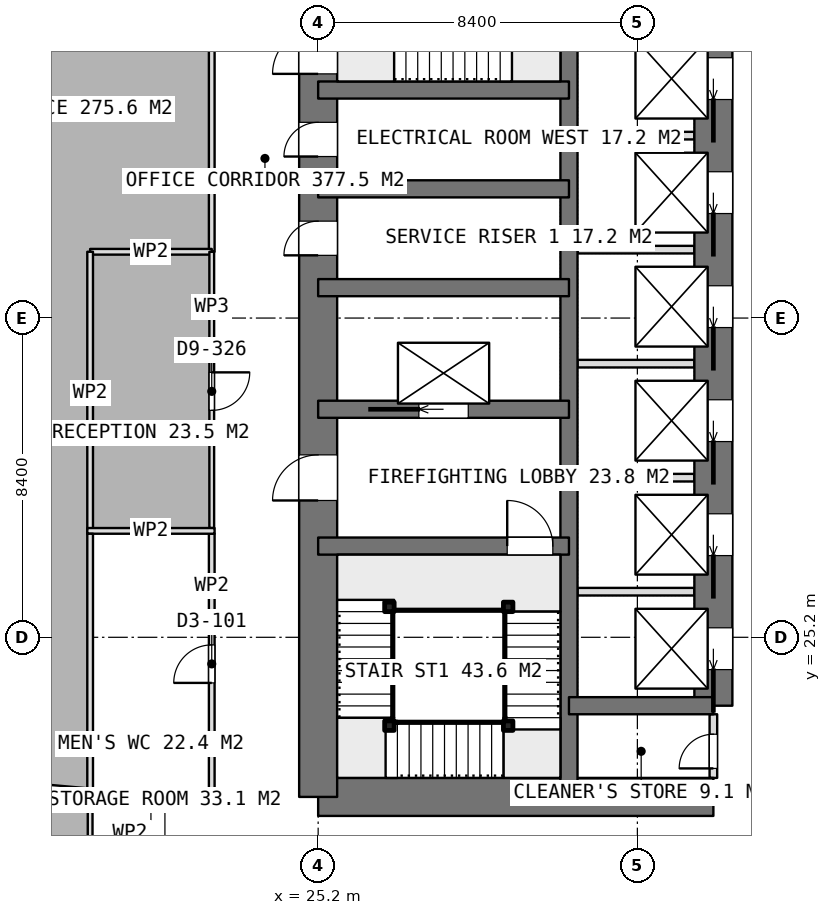
"""IFC4 building model, lengths in metres.
Left out: names, types, materials, properties, quantities, classifications, styles, units other than length and angle.
Written with IfcOpenShell. Run it as: python <this file> out.ifc"""

import sys

from ifc_helpers import new_model, si_unit, direction, frame, frame_2d, origin, origin_2d, place, context, subcontext, project, spatial, rectangle, extrude, element, fill, save


model = new_model("IFC4")
c1 = context("Model", 3, precision=1e-05, world=origin(), true_north=direction((0.0, 1.0)))
c2 = subcontext(c1, "Body", "Model", "MODEL_VIEW")
j1 = project(units=[si_unit("LENGTHUNIT", "METRE"), si_unit("PLANEANGLEUNIT", "RADIAN")], contexts=[c1])
p1 = place(None, origin())
s1 = spatial("IfcSite", under=j1, at=p1, CompositionType="ELEMENT")
p2 = place(p1, origin())
s2 = spatial("IfcBuilding", under=s1, at=p2, CompositionType="ELEMENT")
p3 = place(p2, frame((0.0, 0.0, 99.05)))
s3 = spatial("IfcBuildingStorey", under=s2, at=p3, CompositionType="ELEMENT", Elevation=99.05)
p4 = place(p3, frame((25.2, 21.0, 0.0), z_axis=(0.0, 0.0, 1.0), x_axis=(1.0, 0.0, 0.0)))
e1 = element("IfcWall", 1, at=p4, inside=s3, PredefinedType="SHEAR", context=c2, shape_type="SweptSolid", body=[
    extrude(rectangle(XDim=10.4, YDim=1.0, at=frame_2d((5.2, 0.0))), origin(), (0.0, 0.0, 1.0), 3.75),
])
p5 = place(p3, frame((25.2, 21.0, 0.0), z_axis=(0.0, 0.0, 1.0), x_axis=(0.0, 1.0, 0.0)))
e2 = element("IfcWall", 2, at=p5, inside=s3, PredefinedType="SHEAR", context=c2, shape_type="SweptSolid", body=[
    extrude(rectangle(XDim=25.2, YDim=1.0, at=frame_2d((12.6, 0.0))), origin(), (0.0, 0.0, 1.0), 3.75),
])
p6 = place(p5, frame((7.8, 0.0, 0.0)))
e3 = element("IfcOpeningElement", 3, at=p6, cuts=e2, PredefinedType="OPENING", context=c2, shape_type="SweptSolid", body=[
    extrude(rectangle(XDim=1.2, YDim=2.1, at=frame_2d((0.6, 1.05))), frame((0.0, 0.51, 0.0), z_axis=(0.0, -1.0, 0.0), x_axis=(1.0, 0.0, 0.0)), (0.0, 0.0, 1.0), 1.02),
])
p7 = place(p5, frame((14.25, 0.0, 0.0)))
e4 = element("IfcOpeningElement", 4, at=p7, cuts=e2, PredefinedType="OPENING", context=c2, shape_type="SweptSolid", body=[
    extrude(rectangle(XDim=0.9, YDim=2.1, at=frame_2d((0.45, 1.05))), frame((0.0, 0.51, 0.0), z_axis=(0.0, -1.0, 0.0), x_axis=(1.0, 0.0, 0.0)), (0.0, 0.0, 1.0), 1.02),
])
p8 = place(p5, frame((16.85, 0.0, 0.0)))
e5 = element("IfcOpeningElement", 5, at=p8, cuts=e2, PredefinedType="OPENING", context=c2, shape_type="SweptSolid", body=[
    extrude(rectangle(XDim=0.9, YDim=2.1, at=frame_2d((0.45, 1.05))), frame((0.0, 0.51, 0.0), z_axis=(0.0, -1.0, 0.0), x_axis=(1.0, 0.0, 0.0)), (0.0, 0.0, 1.0), 1.02),
])
p9 = place(p5, frame((19.025, 0.0, 0.0)))
e6 = element("IfcOpeningElement", 6, at=p9, cuts=e2, PredefinedType="OPENING", context=c2, shape_type="SweptSolid", body=[
    extrude(rectangle(XDim=1.2, YDim=2.1, at=frame_2d((0.6, 1.05))), frame((0.0, 0.51, 0.0), z_axis=(0.0, -1.0, 0.0), x_axis=(1.0, 0.0, 0.0)), (0.0, 0.0, 1.0), 1.02),
])
p10 = place(p3, frame((31.8, 21.0, 0.0), z_axis=(0.0, 0.0, 1.0), x_axis=(0.0, 1.0, 0.0)))
e7 = element("IfcWall", 7, at=p10, inside=s3, PredefinedType="SHEAR", context=c2, shape_type="SweptSolid", body=[
    extrude(rectangle(XDim=25.2, YDim=0.45, at=frame_2d((12.6, 0.0))), origin(), (0.0, 0.0, 1.0), 3.75),
])
p11 = place(p3, frame((35.6, 23.4, 0.0), z_axis=(0.0, 0.0, 1.0), x_axis=(0.0, 1.0, 0.0)))
e8 = element("IfcWall", 8, at=p11, inside=s3, PredefinedType="SHEAR", context=c2, shape_type="SweptSolid", body=[
    extrude(rectangle(XDim=18.0, YDim=1.0, at=frame_2d((9.0, 0.0))), origin(), (0.0, 0.0, 1.0), 3.75),
])
p12 = place(p11, frame((0.95, 0.0, 0.0)))
e9 = element("IfcOpeningElement", 9, at=p12, cuts=e8, PredefinedType="OPENING", context=c2, shape_type="SweptSolid", body=[
    extrude(rectangle(XDim=1.1, YDim=2.1, at=frame_2d((0.55, 1.05))), frame((0.0, 0.51, 0.0), z_axis=(0.0, -1.0, 0.0), x_axis=(1.0, 0.0, 0.0)), (0.0, 0.0, 1.0), 1.02),
])
p13 = place(p11, frame((3.95, 0.0, 0.0)))
e10 = element("IfcOpeningElement", 10, at=p13, cuts=e8, PredefinedType="OPENING", context=c2, shape_type="SweptSolid", body=[
    extrude(rectangle(XDim=1.1, YDim=2.1, at=frame_2d((0.55, 1.05))), frame((0.0, 0.51, 0.0), z_axis=(0.0, -1.0, 0.0), x_axis=(1.0, 0.0, 0.0)), (0.0, 0.0, 1.0), 1.02),
])
p14 = place(p11, frame((6.95, 0.0, 0.0)))
e11 = element("IfcOpeningElement", 11, at=p14, cuts=e8, PredefinedType="OPENING", context=c2, shape_type="SweptSolid", body=[
    extrude(rectangle(XDim=1.1, YDim=2.1, at=frame_2d((0.55, 1.05))), frame((0.0, 0.51, 0.0), z_axis=(0.0, -1.0, 0.0), x_axis=(1.0, 0.0, 0.0)), (0.0, 0.0, 1.0), 1.02),
])
p15 = place(p11, frame((9.95, 0.0, 0.0)))
e12 = element("IfcOpeningElement", 12, at=p15, cuts=e8, PredefinedType="OPENING", context=c2, shape_type="SweptSolid", body=[
    extrude(rectangle(XDim=1.1, YDim=2.1, at=frame_2d((0.55, 1.05))), frame((0.0, 0.51, 0.0), z_axis=(0.0, -1.0, 0.0), x_axis=(1.0, 0.0, 0.0)), (0.0, 0.0, 1.0), 1.02),
])
p16 = place(p11, frame((12.95, 0.0, 0.0)))
e13 = element("IfcOpeningElement", 13, at=p16, cuts=e8, PredefinedType="OPENING", context=c2, shape_type="SweptSolid", body=[
    extrude(rectangle(XDim=1.1, YDim=2.1, at=frame_2d((0.55, 1.05))), frame((0.0, 0.51, 0.0), z_axis=(0.0, -1.0, 0.0), x_axis=(1.0, 0.0, 0.0)), (0.0, 0.0, 1.0), 1.02),
])
p17 = place(p11, frame((15.95, 0.0, 0.0)))
e14 = element("IfcOpeningElement", 14, at=p17, cuts=e8, PredefinedType="OPENING", context=c2, shape_type="SweptSolid", body=[
    extrude(rectangle(XDim=1.1, YDim=2.1, at=frame_2d((0.55, 1.05))), frame((0.0, 0.51, 0.0), z_axis=(0.0, -1.0, 0.0), x_axis=(1.0, 0.0, 0.0)), (0.0, 0.0, 1.0), 1.02),
])
p18 = place(p3, frame((31.8, 23.4, 0.0), z_axis=(0.0, 0.0, 1.0), x_axis=(1.0, 0.0, 0.0)))
e15 = element("IfcWall", 15, at=p18, inside=s3, PredefinedType="SHEAR", context=c2, shape_type="SweptSolid", body=[
    extrude(rectangle(XDim=3.8, YDim=0.45, at=frame_2d((1.9, 0.0))), origin(), (0.0, 0.0, 1.0), 3.75),
])
p19 = place(p3, frame((25.2, 27.6, 0.0), z_axis=(0.0, 0.0, 1.0), x_axis=(1.0, 0.0, 0.0)))
e16 = element("IfcWall", 16, at=p19, inside=s3, PredefinedType="SHEAR", context=c2, shape_type="SweptSolid", body=[
    extrude(rectangle(XDim=6.6, YDim=0.45, at=frame_2d((3.3, 0.0))), origin(), (0.0, 0.0, 1.0), 3.75),
])
p20 = place(p19, frame((4.975, 0.0, 0.0)))
e17 = element("IfcOpeningElement", 17, at=p20, cuts=e16, PredefinedType="OPENING", context=c2, shape_type="SweptSolid", body=[
    extrude(rectangle(XDim=1.2, YDim=2.1, at=frame_2d((0.6, 1.05))), frame((0.0, 0.235, 0.0), z_axis=(0.0, -1.0, 0.0), x_axis=(1.0, 0.0, 0.0)), (0.0, 0.0, 1.0), 0.47),
])
p21 = place(p3, frame((25.2, 31.2, 0.0), z_axis=(0.0, 0.0, 1.0), x_axis=(1.0, 0.0, 0.0)))
e18 = element("IfcWall", 18, at=p21, inside=s3, PredefinedType="SHEAR", context=c2, shape_type="SweptSolid", body=[
    extrude(rectangle(XDim=6.6, YDim=0.45, at=frame_2d((3.3, 0.0))), origin(), (0.0, 0.0, 1.0), 3.75),
])
p22 = place(p21, frame((2.65, 0.0, 0.0)))
e19 = element("IfcOpeningElement", 19, at=p22, cuts=e18, PredefinedType="OPENING", context=c2, shape_type="SweptSolid", body=[
    extrude(rectangle(XDim=1.3, YDim=2.1, at=frame_2d((0.65, 1.05))), frame((0.0, 0.235, 0.0), z_axis=(0.0, -1.0, 0.0), x_axis=(1.0, 0.0, 0.0)), (0.0, 0.0, 1.0), 0.47),
])
for number, where, z_axis, x_axis in (
    (20, (25.2, 34.4, 0.0), (0.0, 0.0, 1.0), (1.0, 0.0, 0.0)),
    (21, (25.2, 37.0, 0.0), (0.0, 0.0, 1.0), (1.0, 0.0, 0.0)),
    (22, (25.2, 39.6, 0.0), (0.0, 0.0, 1.0), (1.0, 0.0, 0.0)),
):
    element("IfcWall", number, at=place(p3, frame(where, z_axis=z_axis, x_axis=x_axis)), inside=s3, PredefinedType="SHEAR", context=c2, shape_type="SweptSolid", body=[
        extrude(rectangle(XDim=6.6, YDim=0.45, at=frame_2d((3.3, 0.0))), origin(), (0.0, 0.0, 1.0), 3.75),
    ])
for number, where, z_axis, x_axis in (
    (23, (32.025, 26.4, 0.0), (0.0, 0.0, 1.0), (1.0, 0.0, 0.0)),
    (24, (32.025, 29.4, 0.0), (0.0, 0.0, 1.0), (1.0, 0.0, 0.0)),
    (25, (32.025, 32.4, 0.0), (0.0, 0.0, 1.0), (1.0, 0.0, 0.0)),
    (26, (32.025, 35.4, 0.0), (0.0, 0.0, 1.0), (1.0, 0.0, 0.0)),
    (27, (32.025, 38.4, 0.0), (0.0, 0.0, 1.0), (1.0, 0.0, 0.0)),
):
    element("IfcWall", number, at=place(p3, frame(where, z_axis=z_axis, x_axis=x_axis)), inside=s3, PredefinedType="PARTITIONING", context=c2, shape_type="SweptSolid", body=[
        extrude(rectangle(XDim=3.075, YDim=0.2, at=frame_2d((1.538, 0.0))), origin(), (0.0, 0.0, 1.0), 3.5),
    ])
p23 = place(p3, frame((35.6, 21.5, 0.0), z_axis=(0.0, 0.0, 1.0), x_axis=(0.0, 1.0, 0.0)))
e28 = element("IfcWall", 28, at=p23, inside=s3, PredefinedType="PARTITIONING", context=c2, shape_type="SweptSolid", body=[
    extrude(rectangle(XDim=1.675, YDim=0.2, at=frame_2d((0.837, 0.0))), origin(), (0.0, 0.0, 1.0), 3.5),
])
p24 = place(p23, frame((0.25, 0.0, 0.0)))
e29 = element("IfcOpeningElement", 29, at=p24, cuts=e28, PredefinedType="OPENING", context=c2, shape_type="SweptSolid", body=[
    extrude(rectangle(XDim=0.9, YDim=2.1, at=frame_2d((0.45, 1.05))), frame((0.0, 0.11, 0.0), z_axis=(0.0, -1.0, 0.0), x_axis=(1.0, 0.0, 0.0)), (0.0, 0.0, 1.0), 0.22),
])
for number, where, z_axis, x_axis in (
    (30, (19.125, 21.0, 0.0), (0.0, 0.0, 1.0), (1.0, 0.0, 0.0)),
    (31, (19.125, 28.0, 0.0), (0.0, 0.0, 1.0), (1.0, 0.0, 0.0)),
):
    element("IfcWall", number, at=place(p3, frame(where, z_axis=z_axis, x_axis=x_axis)), inside=s3, PredefinedType="PARTITIONING", context=c2, shape_type="SweptSolid", body=[
        extrude(rectangle(XDim=3.35, YDim=0.15, at=frame_2d((1.675, 0.0))), origin(), (0.0, 0.0, 1.0), 3.5),
    ])
p25 = place(p3, frame((19.2, 21.075, 0.0), z_axis=(0.0, 0.0, 1.0), x_axis=(0.0, 1.0, 0.0)))
e32 = element("IfcWall", 32, at=p25, inside=s3, PredefinedType="PARTITIONING", context=c2, shape_type="SweptSolid", body=[
    extrude(rectangle(XDim=6.85, YDim=0.15, at=frame_2d((3.425, 0.0))), origin(), (0.0, 0.0, 1.0), 3.5),
])
p26 = place(p3, frame((22.4, 21.075, 0.0), z_axis=(0.0, 0.0, 1.0), x_axis=(0.0, 1.0, 0.0)))
e33 = element("IfcWall", 33, at=p26, inside=s3, PredefinedType="PARTITIONING", context=c2, shape_type="SweptSolid", body=[
    extrude(rectangle(XDim=6.85, YDim=0.15, at=frame_2d((3.425, 0.0))), origin(), (0.0, 0.0, 1.0), 3.5),
])
p27 = place(p26, frame((2.925, 0.0, 0.0)))
e34 = element("IfcOpeningElement", 34, at=p27, cuts=e33, PredefinedType="OPENING", context=c2, shape_type="SweptSolid", body=[
    extrude(rectangle(XDim=1.0, YDim=2.1, at=frame_2d((0.5, 1.05))), frame((0.0, 0.085, 0.0), z_axis=(0.0, -1.0, 0.0), x_axis=(1.0, 0.0, 0.0)), (0.0, 0.0, 1.0), 0.17),
])
p28 = place(p3, frame((22.4, 52.75, 0.0), z_axis=(0.0, 0.0, 1.0), x_axis=(0.0, -1.0, 0.0)))
e35 = element("IfcWall", 35, at=p28, inside=s3, PredefinedType="PARTITIONING", context=c2, shape_type="SweptSolid", body=[
    extrude(rectangle(XDim=17.406, YDim=0.15, at=frame_2d((8.703, 0.0))), origin(), (0.0, 0.0, 1.0), 3.5),
])
p29 = place(p28, frame((8.203, 0.0, 0.0)))
e36 = element("IfcOpeningElement", 36, at=p29, cuts=e35, PredefinedType="OPENING", context=c2, shape_type="SweptSolid", body=[
    extrude(rectangle(XDim=1.0, YDim=2.1, at=frame_2d((0.5, 1.05))), frame((0.0, 0.085, 0.0), z_axis=(0.0, -1.0, 0.0), x_axis=(1.0, 0.0, 0.0)), (0.0, 0.0, 1.0), 0.17),
])
p30 = place(p3, frame((22.4, 35.344, 0.0), z_axis=(0.0, 0.0, 1.0), x_axis=(-1.0, 0.0, 0.0)))
e37 = element("IfcWall", 37, at=p30, inside=s3, PredefinedType="PARTITIONING", context=c2, shape_type="SweptSolid", body=[
    extrude(rectangle(XDim=3.2, YDim=0.15, at=frame_2d((1.6, 0.0))), origin(), (0.0, 0.0, 1.0), 3.5),
])
p31 = place(p3, frame((19.2, 35.344, 0.0), z_axis=(0.0, 0.0, 1.0), x_axis=(0.0, -1.0, 0.0)))
e38 = element("IfcWall", 38, at=p31, inside=s3, PredefinedType="PARTITIONING", context=c2, shape_type="SweptSolid", body=[
    extrude(rectangle(XDim=7.419, YDim=0.15, at=frame_2d((3.709, 0.0))), origin(), (0.0, 0.0, 1.0), 3.5),
])
p32 = place(p3, frame((19.125, 21.153, 0.0), z_axis=(0.0, 0.0, 1.0), x_axis=(-0.995937155539, 0.090050997869, 0.0)))
e39 = element("IfcWall", 39, at=p32, inside=s3, PredefinedType="PARTITIONING", context=c2, shape_type="SweptSolid", body=[
    extrude(rectangle(XDim=1.998, YDim=0.15, at=frame_2d((0.999, 0.0))), origin(), (0.0, 0.0, 1.0), 3.5),
])
p33 = place(p3, frame((19.2, 21.074, 0.0), z_axis=(0.0, 0.0, 1.0), x_axis=(0.0, -1.0, 0.0)))
e40 = element("IfcWall", 40, at=p33, inside=s3, PredefinedType="PARTITIONING", context=c2, shape_type="SweptSolid", body=[
    extrude(rectangle(XDim=2.674, YDim=0.125, at=frame_2d((1.337, 0.0))), origin(), (0.0, 0.0, 1.0), 3.5),
])
p34 = place(p3, frame((22.4, 35.343, 0.0), z_axis=(0.0, 0.0, 1.0), x_axis=(0.0, -1.0, 0.0)))
e41 = element("IfcWall", 41, at=p34, inside=s3, PredefinedType="PARTITIONING", context=c2, shape_type="SweptSolid", body=[
    extrude(rectangle(XDim=7.268, YDim=0.125, at=frame_2d((3.634, 0.0))), origin(), (0.0, 0.0, 1.0), 3.5),
])
p35 = place(p34, frame((3.172, 0.0, 0.0)))
e42 = element("IfcOpeningElement", 42, at=p35, cuts=e41, PredefinedType="OPENING", context=c2, shape_type="SweptSolid", body=[
    extrude(rectangle(XDim=1.0, YDim=2.1, at=frame_2d((0.5, 1.05))), frame((0.0, 0.073, 0.0), z_axis=(0.0, -1.0, 0.0), x_axis=(1.0, 0.0, 0.0)), (0.0, 0.0, 1.0), 0.145),
])
for number, where, z_axis, x_axis in (
    (43, (30.2, 26.0, 0.0), (0.0, 0.0, 1.0), (1.0, 0.0, 0.0)),
    (44, (30.2, 22.875, 0.0), (0.0, 0.0, 1.0), (1.0, 0.0, 0.0)),
    (45, (27.075, 22.875, 0.0), (0.0, 0.0, 1.0), (1.0, 0.0, 0.0)),
    (46, (27.075, 26.0, 0.0), (0.0, 0.0, 1.0), (1.0, 0.0, 0.0)),
):
    element("IfcColumn", number, at=place(p3, frame(where, z_axis=z_axis, x_axis=x_axis)), inside=s3, PredefinedType="COLUMN", context=c2, shape_type="SweptSolid", body=[
        extrude(rectangle(XDim=0.25, YDim=0.25, at=origin_2d()), origin(), (0.0, 0.0, 1.0), 3.75),
    ])
p36 = place(p6, origin())
e47 = element("IfcDoor", 47, at=p36, inside=s3, OperationType="SINGLE_SWING_LEFT", PredefinedType="DOOR", context=c2, shape_type="SweptSolid", body=[
    extrude(rectangle(XDim=1.2, YDim=2.1, at=frame_2d((0.6, 1.05))), frame((0.0, 0.025, 0.0), z_axis=(0.0, -1.0, 0.0), x_axis=(1.0, 0.0, 0.0)), (0.0, 0.0, 1.0), 0.05),
])
fill(e3, e47)
p37 = place(p7, origin())
e48 = element("IfcDoor", 48, at=p37, inside=s3, OperationType="SINGLE_SWING_LEFT", PredefinedType="DOOR", context=c2, shape_type="SweptSolid", body=[
    extrude(rectangle(XDim=0.9, YDim=2.1, at=frame_2d((0.45, 1.05))), frame((0.0, 0.025, 0.0), z_axis=(0.0, -1.0, 0.0), x_axis=(1.0, 0.0, 0.0)), (0.0, 0.0, 1.0), 0.05),
])
fill(e4, e48)
p38 = place(p8, origin())
e49 = element("IfcDoor", 49, at=p38, inside=s3, OperationType="SINGLE_SWING_LEFT", PredefinedType="DOOR", context=c2, shape_type="SweptSolid", body=[
    extrude(rectangle(XDim=0.9, YDim=2.1, at=frame_2d((0.45, 1.05))), frame((0.0, 0.025, 0.0), z_axis=(0.0, -1.0, 0.0), x_axis=(1.0, 0.0, 0.0)), (0.0, 0.0, 1.0), 0.05),
])
fill(e5, e49)
p39 = place(p24, origin())
e50 = element("IfcDoor", 50, at=p39, inside=s3, OperationType="SINGLE_SWING_LEFT", PredefinedType="DOOR", context=c2, shape_type="SweptSolid", body=[
    extrude(rectangle(XDim=0.9, YDim=2.1, at=frame_2d((0.45, 1.05))), frame((0.0, 0.025, 0.0), z_axis=(0.0, -1.0, 0.0), x_axis=(1.0, 0.0, 0.0)), (0.0, 0.0, 1.0), 0.05),
])
fill(e29, e50)
p40 = place(p12, origin())
e51 = element("IfcDoor", 51, at=p40, inside=s3, OperationType="SLIDING_TO_LEFT", PredefinedType="USERDEFINED", context=c2, shape_type="SweptSolid", body=[
    extrude(rectangle(XDim=1.1, YDim=2.1, at=frame_2d((0.55, 1.05))), frame((0.0, 0.025, 0.0), z_axis=(0.0, -1.0, 0.0), x_axis=(1.0, 0.0, 0.0)), (0.0, 0.0, 1.0), 0.05),
])
fill(e9, e51)
p41 = place(p13, origin())
e52 = element("IfcDoor", 52, at=p41, inside=s3, OperationType="SLIDING_TO_LEFT", PredefinedType="USERDEFINED", context=c2, shape_type="SweptSolid", body=[
    extrude(rectangle(XDim=1.1, YDim=2.1, at=frame_2d((0.55, 1.05))), frame((0.0, 0.025, 0.0), z_axis=(0.0, -1.0, 0.0), x_axis=(1.0, 0.0, 0.0)), (0.0, 0.0, 1.0), 0.05),
])
fill(e10, e52)
p42 = place(p14, origin())
e53 = element("IfcDoor", 53, at=p42, inside=s3, OperationType="SLIDING_TO_LEFT", PredefinedType="USERDEFINED", context=c2, shape_type="SweptSolid", body=[
    extrude(rectangle(XDim=1.1, YDim=2.1, at=frame_2d((0.55, 1.05))), frame((0.0, 0.025, 0.0), z_axis=(0.0, -1.0, 0.0), x_axis=(1.0, 0.0, 0.0)), (0.0, 0.0, 1.0), 0.05),
])
fill(e11, e53)
p43 = place(p15, origin())
e54 = element("IfcDoor", 54, at=p43, inside=s3, OperationType="SLIDING_TO_LEFT", PredefinedType="USERDEFINED", context=c2, shape_type="SweptSolid", body=[
    extrude(rectangle(XDim=1.1, YDim=2.1, at=frame_2d((0.55, 1.05))), frame((0.0, 0.025, 0.0), z_axis=(0.0, -1.0, 0.0), x_axis=(1.0, 0.0, 0.0)), (0.0, 0.0, 1.0), 0.05),
])
fill(e12, e54)
p44 = place(p16, origin())
e55 = element("IfcDoor", 55, at=p44, inside=s3, OperationType="SLIDING_TO_LEFT", PredefinedType="USERDEFINED", context=c2, shape_type="SweptSolid", body=[
    extrude(rectangle(XDim=1.1, YDim=2.1, at=frame_2d((0.55, 1.05))), frame((0.0, 0.025, 0.0), z_axis=(0.0, -1.0, 0.0), x_axis=(1.0, 0.0, 0.0)), (0.0, 0.0, 1.0), 0.05),
])
fill(e13, e55)
p45 = place(p17, origin())
e56 = element("IfcDoor", 56, at=p45, inside=s3, OperationType="SLIDING_TO_LEFT", PredefinedType="USERDEFINED", context=c2, shape_type="SweptSolid", body=[
    extrude(rectangle(XDim=1.1, YDim=2.1, at=frame_2d((0.55, 1.05))), frame((0.0, 0.025, 0.0), z_axis=(0.0, -1.0, 0.0), x_axis=(1.0, 0.0, 0.0)), (0.0, 0.0, 1.0), 0.05),
])
fill(e14, e56)
p46 = place(p22, origin())
e57 = element("IfcDoor", 57, at=p46, inside=s3, OperationType="SLIDING_TO_LEFT", PredefinedType="USERDEFINED", context=c2, shape_type="SweptSolid", body=[
    extrude(rectangle(XDim=1.3, YDim=2.1, at=frame_2d((0.65, 1.05))), frame((0.0, 0.025, 0.0), z_axis=(0.0, -1.0, 0.0), x_axis=(1.0, 0.0, 0.0)), (0.0, 0.0, 1.0), 0.05),
])
fill(e19, e57)
p47 = place(p27, origin())
e58 = element("IfcDoor", 58, at=p47, inside=s3, OperationType="SINGLE_SWING_LEFT", PredefinedType="DOOR", context=c2, shape_type="SweptSolid", body=[
    extrude(rectangle(XDim=1.0, YDim=2.1, at=frame_2d((0.5, 1.05))), frame((0.0, 0.025, 0.0), z_axis=(0.0, -1.0, 0.0), x_axis=(1.0, 0.0, 0.0)), (0.0, 0.0, 1.0), 0.05),
])
fill(e34, e58)
p48 = place(p35, origin())
e59 = element("IfcDoor", 59, at=p48, inside=s3, OperationType="SINGLE_SWING_LEFT", PredefinedType="DOOR", context=c2, shape_type="SweptSolid", body=[
    extrude(rectangle(XDim=1.0, YDim=2.1, at=frame_2d((0.5, 1.05))), frame((0.0, 0.025, 0.0), z_axis=(0.0, -1.0, 0.0), x_axis=(1.0, 0.0, 0.0)), (0.0, 0.0, 1.0), 0.05),
])
fill(e42, e59)
p49 = place(p20, origin())
e60 = element("IfcDoor", 60, at=p49, inside=s3, OperationType="SINGLE_SWING_RIGHT", PredefinedType="DOOR", context=c2, shape_type="SweptSolid", body=[
    extrude(rectangle(XDim=1.2, YDim=2.1, at=frame_2d((0.6, 1.05))), frame((0.0, 0.025, 0.0), z_axis=(0.0, -1.0, 0.0), x_axis=(1.0, 0.0, 0.0)), (0.0, 0.0, 1.0), 0.05),
])
fill(e17, e60)
p50 = place(p9, origin())
e61 = element("IfcDoor", 61, at=p50, inside=s3, OperationType="SINGLE_SWING_RIGHT", PredefinedType="DOOR", context=c2, shape_type="SweptSolid", body=[
    extrude(rectangle(XDim=1.2, YDim=2.1, at=frame_2d((0.6, 1.05))), frame((0.0, 0.025, 0.0), z_axis=(0.0, -1.0, 0.0), x_axis=(1.0, 0.0, 0.0)), (0.0, 0.0, 1.0), 0.05),
])
fill(e6, e61)
save(model, sys.argv[1])
